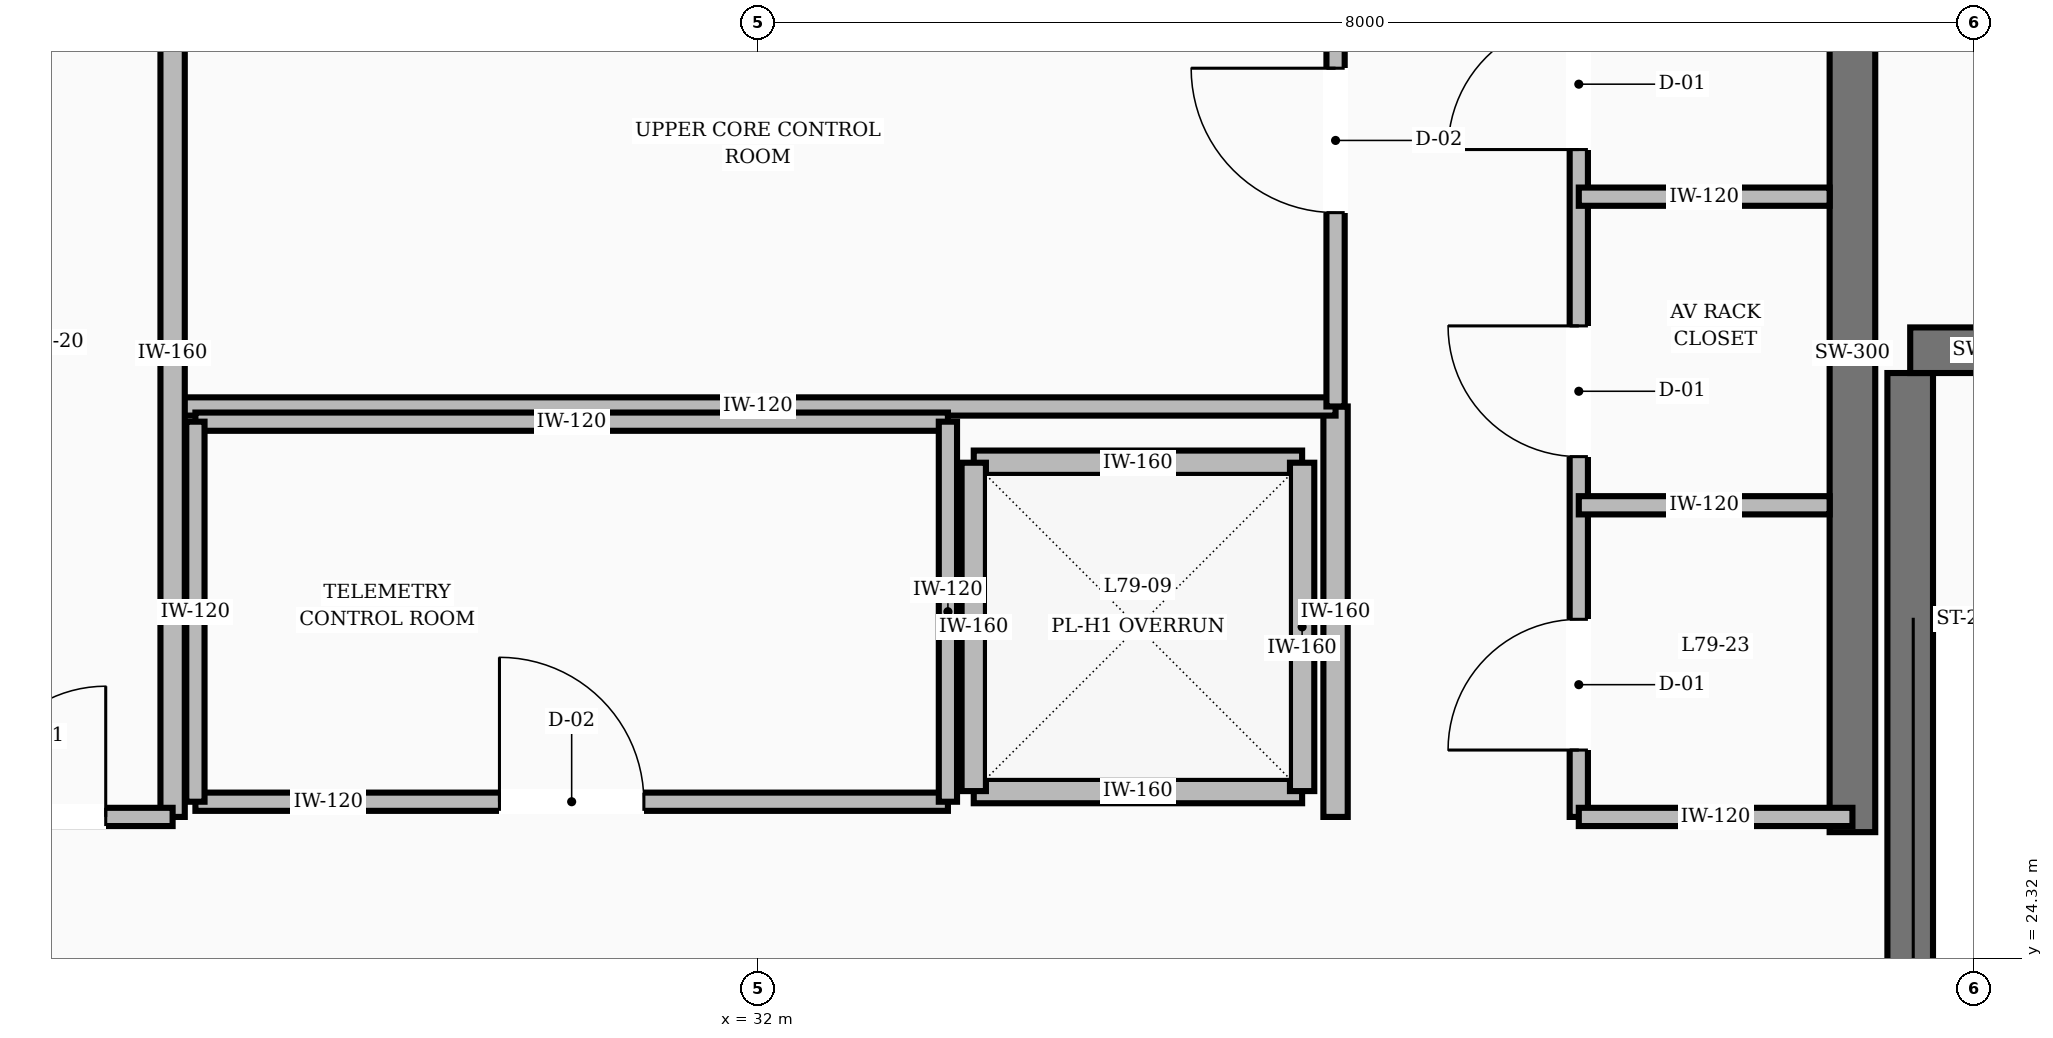
"""IFC4 building model, lengths in metres.
Left out: names, types, materials, properties, quantities, classifications, styles, units other than length and angle.
Written with IfcOpenShell. Run it as: python <this file> out.ifc"""

import sys

from ifc_helpers import new_model, si_unit, direction, frame, frame_2d, origin, place, context, subcontext, project, spatial, rectangle, extrude, element, fill, save


model = new_model("IFC4")
c1 = context("Model", 3, precision=1e-05, world=origin(), true_north=direction((0.0, 1.0)))
c2 = subcontext(c1, "Body", "Model", "MODEL_VIEW")
j1 = project(units=[si_unit("LENGTHUNIT", "METRE"), si_unit("PLANEANGLEUNIT", "RADIAN")], contexts=[c1])
p1 = place(None, origin())
s1 = spatial("IfcSite", under=j1, at=p1, CompositionType="ELEMENT")
p2 = place(p1, origin())
s2 = spatial("IfcBuilding", under=s1, at=p2, CompositionType="ELEMENT")
p3 = place(p2, frame((0.0, 0.0, 302.4)))
s3 = spatial("IfcBuildingStorey", under=s2, at=p3, CompositionType="ELEMENT", Elevation=302.4)
p4 = place(p3, frame((39.2, 25.15, 0.0), z_axis=(0.0, 0.0, 1.0), x_axis=(0.0, 1.0, 0.0)))
e1 = element("IfcWall", 1, at=p4, inside=s3, PredefinedType="SHEAR", context=c2, shape_type="SweptSolid", body=[
    extrude(rectangle(XDim=6.3, YDim=0.3, at=frame_2d((3.15, 0.0))), origin(), (0.0, 0.0, 1.0), 6.0),
])
p5 = place(p3, frame((39.58, 19.43, 0.0), z_axis=(0.0, 0.0, 1.0), x_axis=(0.0, 1.0, 0.0)))
e2 = element("IfcWall", 2, at=p5, inside=s3, PredefinedType="SHEAR", context=c2, shape_type="SweptSolid", body=[
    extrude(rectangle(XDim=8.74, YDim=0.3, at=frame_2d((4.37, 0.0))), origin(), (0.0, 0.0, 1.0), 6.0),
])
p6 = place(p3, frame((39.58, 28.32, 0.0), z_axis=(0.0, 0.0, 1.0), x_axis=(1.0, 0.0, 0.0)))
e3 = element("IfcWall", 3, at=p6, inside=s3, PredefinedType="SHEAR", context=c2, shape_type="SweptSolid", body=[
    extrude(rectangle(XDim=3.6, YDim=0.3, at=frame_2d((1.8, 0.0))), origin(), (0.0, 0.0, 1.0), 6.0),
])
p7 = place(p6, frame((1.3, 0.0, 0.0)))
e4 = element("IfcOpeningElement", 4, at=p7, cuts=e3, PredefinedType="OPENING", context=c2, shape_type="SweptSolid", body=[
    extrude(rectangle(XDim=1.1, YDim=2.1, at=frame_2d((0.55, 1.05))), frame((0.0, 0.16, 0.0), z_axis=(0.0, -1.0, 0.0), x_axis=(1.0, 0.0, 0.0)), (0.0, 0.0, 1.0), 0.32),
])
p8 = place(p3, frame((35.8, 25.25, 0.0), z_axis=(0.0, 0.0, 1.0), x_axis=(0.0, 1.0, 0.0)))
e5 = element("IfcWall", 5, at=p8, inside=s3, PredefinedType="SOLIDWALL", context=c2, shape_type="SweptSolid", body=[
    extrude(rectangle(XDim=2.7, YDim=0.16, at=frame_2d((1.35, 0.0))), origin(), (0.0, 0.0, 1.0), 4.65),
])
for number, where, z_axis, x_axis in (
    (6, (33.42, 25.42, 0.0), (0.0, 0.0, 1.0), (1.0, 0.0, 0.0)),
    (7, (33.42, 27.58, 0.0), (0.0, 0.0, 1.0), (1.0, 0.0, 0.0)),
    (8, (33.42, 25.42, 0.0), (0.0, 0.0, 1.0), (0.0, 1.0, 0.0)),
    (9, (35.58, 25.42, 0.0), (0.0, 0.0, 1.0), (0.0, 1.0, 0.0)),
):
    element("IfcWall", number, at=place(p3, frame(where, z_axis=z_axis, x_axis=x_axis)), inside=s3, PredefinedType="SOLIDWALL", context=c2, shape_type="SweptSolid", body=[
        extrude(rectangle(XDim=2.16, YDim=0.16, at=frame_2d((1.08, 0.0))), origin(), (0.0, 0.0, 1.0), 4.65),
    ])
p9 = place(p3, frame((28.2, 27.95, 0.0), z_axis=(0.0, 0.0, 1.0), x_axis=(1.0, 0.0, 0.0)))
e10 = element("IfcWall", 10, at=p9, inside=s3, PredefinedType="PARTITIONING", context=c2, shape_type="SweptSolid", body=[
    extrude(rectangle(XDim=7.6, YDim=0.12, at=frame_2d((3.8, 0.0))), origin(), (0.0, 0.0, 1.0), 4.65),
])
p10 = place(p3, frame((35.8, 27.95, 0.0), z_axis=(0.0, 0.0, 1.0), x_axis=(0.0, 1.0, 0.0)))
e11 = element("IfcWall", 11, at=p10, inside=s3, PredefinedType="PARTITIONING", context=c2, shape_type="SweptSolid", body=[
    extrude(rectangle(XDim=3.5, YDim=0.12, at=frame_2d((1.75, 0.0))), origin(), (0.0, 0.0, 1.0), 4.65),
])
p11 = place(p10, frame((1.275, 0.0, 0.0)))
e12 = element("IfcOpeningElement", 12, at=p11, cuts=e11, PredefinedType="OPENING", context=c2, shape_type="SweptSolid", body=[
    extrude(rectangle(XDim=0.95, YDim=2.1, at=frame_2d((0.475, 1.05))), frame((0.0, 0.07, 0.0), z_axis=(0.0, -1.0, 0.0), x_axis=(1.0, 0.0, 0.0)), (0.0, 0.0, 1.0), 0.14),
])
p12 = place(p3, frame((28.3, 25.35, 0.0), z_axis=(0.0, 0.0, 1.0), x_axis=(1.0, 0.0, 0.0)))
e13 = element("IfcWall", 13, at=p12, inside=s3, PredefinedType="PARTITIONING", context=c2, shape_type="SweptSolid", body=[
    extrude(rectangle(XDim=4.95, YDim=0.12, at=frame_2d((2.475, 0.0))), origin(), (0.0, 0.0, 1.0), 4.65),
])
p13 = place(p12, frame((2.0, 0.0, 0.0)))
e14 = element("IfcOpeningElement", 14, at=p13, cuts=e13, PredefinedType="OPENING", context=c2, shape_type="SweptSolid", body=[
    extrude(rectangle(XDim=0.95, YDim=2.1, at=frame_2d((0.475, 1.05))), frame((0.0, 0.07, 0.0), z_axis=(0.0, -1.0, 0.0), x_axis=(1.0, 0.0, 0.0)), (0.0, 0.0, 1.0), 0.14),
])
p14 = place(p3, frame((28.3, 27.85, 0.0), z_axis=(0.0, 0.0, 1.0), x_axis=(1.0, 0.0, 0.0)))
e15 = element("IfcWall", 15, at=p14, inside=s3, PredefinedType="PARTITIONING", context=c2, shape_type="SweptSolid", body=[
    extrude(rectangle(XDim=4.95, YDim=0.12, at=frame_2d((2.475, 0.0))), origin(), (0.0, 0.0, 1.0), 4.65),
])
for number, where, z_axis, x_axis in (
    (16, (28.3, 25.35, 0.0), (0.0, 0.0, 1.0), (0.0, 1.0, 0.0)),
    (17, (33.25, 25.35, 0.0), (0.0, 0.0, 1.0), (0.0, 1.0, 0.0)),
):
    element("IfcWall", number, at=place(p3, frame(where, z_axis=z_axis, x_axis=x_axis)), inside=s3, PredefinedType="PARTITIONING", context=c2, shape_type="SweptSolid", body=[
        extrude(rectangle(XDim=2.5, YDim=0.12, at=frame_2d((1.25, 0.0))), origin(), (0.0, 0.0, 1.0), 4.65),
    ])
p15 = place(p3, frame((28.15, 25.25, 0.0), z_axis=(0.0, 0.0, 1.0), x_axis=(0.0, 1.0, 0.0)))
e18 = element("IfcWall", 18, at=p15, inside=s3, PredefinedType="SOLIDWALL", context=c2, shape_type="SweptSolid", body=[
    extrude(rectangle(XDim=6.1, YDim=0.16, at=frame_2d((3.05, 0.0))), origin(), (0.0, 0.0, 1.0), 4.65),
])
p16 = place(p3, frame((24.95, 25.25, 0.0), z_axis=(0.0, 0.0, 1.0), x_axis=(1.0, 0.0, 0.0)))
e19 = element("IfcWall", 19, at=p16, inside=s3, PredefinedType="PARTITIONING", context=c2, shape_type="SweptSolid", body=[
    extrude(rectangle(XDim=3.2, YDim=0.12, at=frame_2d((1.6, 0.0))), origin(), (0.0, 0.0, 1.0), 4.65),
])
p17 = place(p16, frame((0.44, 0.0, 0.0)))
e20 = element("IfcOpeningElement", 20, at=p17, cuts=e19, PredefinedType="OPENING", context=c2, shape_type="SweptSolid", body=[
    extrude(rectangle(XDim=0.86, YDim=2.1, at=frame_2d((0.43, 1.05))), frame((0.0, 0.07, 0.0), z_axis=(0.0, -1.0, 0.0), x_axis=(1.0, 0.0, 0.0)), (0.0, 0.0, 1.0), 0.14),
])
p18 = place(p16, frame((1.9, 0.0, 0.0)))
e21 = element("IfcOpeningElement", 21, at=p18, cuts=e19, PredefinedType="OPENING", context=c2, shape_type="SweptSolid", body=[
    extrude(rectangle(XDim=0.86, YDim=2.1, at=frame_2d((0.43, 1.05))), frame((0.0, 0.07, 0.0), z_axis=(0.0, -1.0, 0.0), x_axis=(1.0, 0.0, 0.0)), (0.0, 0.0, 1.0), 0.14),
])
p19 = place(p3, frame((37.4, 25.25, 0.0), z_axis=(0.0, 0.0, 1.0), x_axis=(0.0, 1.0, 0.0)))
e22 = element("IfcWall", 22, at=p19, inside=s3, PredefinedType="PARTITIONING", context=c2, shape_type="SweptSolid", body=[
    extrude(rectangle(XDim=6.2, YDim=0.12, at=frame_2d((3.1, 0.0))), origin(), (0.0, 0.0, 1.0), 4.65),
])
p20 = place(p19, frame((0.44, 0.0, 0.0)))
e23 = element("IfcOpeningElement", 23, at=p20, cuts=e22, PredefinedType="OPENING", context=c2, shape_type="SweptSolid", body=[
    extrude(rectangle(XDim=0.86, YDim=2.1, at=frame_2d((0.43, 1.05))), frame((0.0, 0.07, 0.0), z_axis=(0.0, -1.0, 0.0), x_axis=(1.0, 0.0, 0.0)), (0.0, 0.0, 1.0), 0.14),
])
p21 = place(p19, frame((2.37, 0.0, 0.0)))
e24 = element("IfcOpeningElement", 24, at=p21, cuts=e22, PredefinedType="OPENING", context=c2, shape_type="SweptSolid", body=[
    extrude(rectangle(XDim=0.86, YDim=2.1, at=frame_2d((0.43, 1.05))), frame((0.0, 0.07, 0.0), z_axis=(0.0, -1.0, 0.0), x_axis=(1.0, 0.0, 0.0)), (0.0, 0.0, 1.0), 0.14),
])
p22 = place(p19, frame((4.39, 0.0, 0.0)))
e25 = element("IfcOpeningElement", 25, at=p22, cuts=e22, PredefinedType="OPENING", context=c2, shape_type="SweptSolid", body=[
    extrude(rectangle(XDim=0.86, YDim=2.1, at=frame_2d((0.43, 1.05))), frame((0.0, 0.07, 0.0), z_axis=(0.0, -1.0, 0.0), x_axis=(1.0, 0.0, 0.0)), (0.0, 0.0, 1.0), 0.14),
])
p23 = place(p3, frame((37.4, 25.25, 0.0), z_axis=(0.0, 0.0, 1.0), x_axis=(1.0, 0.0, 0.0)))
e26 = element("IfcWall", 26, at=p23, inside=s3, PredefinedType="PARTITIONING", context=c2, shape_type="SweptSolid", body=[
    extrude(rectangle(XDim=1.8, YDim=0.12, at=frame_2d((0.9, 0.0))), origin(), (0.0, 0.0, 1.0), 4.65),
])
for number, where, z_axis, x_axis in (
    (27, (37.4, 27.3, 0.0), (0.0, 0.0, 1.0), (1.0, 0.0, 0.0)),
    (28, (37.4, 29.33, 0.0), (0.0, 0.0, 1.0), (1.0, 0.0, 0.0)),
):
    element("IfcWall", number, at=place(p3, frame(where, z_axis=z_axis, x_axis=x_axis)), inside=s3, PredefinedType="PARTITIONING", context=c2, shape_type="SweptSolid", body=[
        extrude(rectangle(XDim=1.65, YDim=0.12, at=frame_2d((0.825, 0.0))), origin(), (0.0, 0.0, 1.0), 4.65),
    ])
p24 = place(p11, origin())
e29 = element("IfcDoor", 29, at=p24, inside=s3, OperationType="SINGLE_SWING_RIGHT", PredefinedType="DOOR", context=c2, shape_type="SweptSolid", body=[
    extrude(rectangle(XDim=0.95, YDim=2.1, at=frame_2d((0.475, 1.05))), frame((0.0, 0.025, 0.0), z_axis=(0.0, -1.0, 0.0), x_axis=(1.0, 0.0, 0.0)), (0.0, 0.0, 1.0), 0.05),
])
fill(e12, e29)
p25 = place(p13, origin())
e30 = element("IfcDoor", 30, at=p25, inside=s3, OperationType="SINGLE_SWING_LEFT", PredefinedType="DOOR", context=c2, shape_type="SweptSolid", body=[
    extrude(rectangle(XDim=0.95, YDim=2.1, at=frame_2d((0.475, 1.05))), frame((0.0, 0.025, 0.0), z_axis=(0.0, -1.0, 0.0), x_axis=(1.0, 0.0, 0.0)), (0.0, 0.0, 1.0), 0.05),
])
fill(e14, e30)
p26 = place(p18, origin())
e31 = element("IfcDoor", 31, at=p26, inside=s3, OperationType="SINGLE_SWING_RIGHT", PredefinedType="DOOR", context=c2, shape_type="SweptSolid", body=[
    extrude(rectangle(XDim=0.86, YDim=2.1, at=frame_2d((0.43, 1.05))), frame((0.0, 0.025, 0.0), z_axis=(0.0, -1.0, 0.0), x_axis=(1.0, 0.0, 0.0)), (0.0, 0.0, 1.0), 0.05),
])
fill(e21, e31)
p27 = place(p20, origin())
e32 = element("IfcDoor", 32, at=p27, inside=s3, OperationType="SINGLE_SWING_LEFT", PredefinedType="DOOR", context=c2, shape_type="SweptSolid", body=[
    extrude(rectangle(XDim=0.86, YDim=2.1, at=frame_2d((0.43, 1.05))), frame((0.0, 0.025, 0.0), z_axis=(0.0, -1.0, 0.0), x_axis=(1.0, 0.0, 0.0)), (0.0, 0.0, 1.0), 0.05),
])
fill(e23, e32)
p28 = place(p21, origin())
e33 = element("IfcDoor", 33, at=p28, inside=s3, OperationType="SINGLE_SWING_RIGHT", PredefinedType="DOOR", context=c2, shape_type="SweptSolid", body=[
    extrude(rectangle(XDim=0.86, YDim=2.1, at=frame_2d((0.43, 1.05))), frame((0.0, 0.025, 0.0), z_axis=(0.0, -1.0, 0.0), x_axis=(1.0, 0.0, 0.0)), (0.0, 0.0, 1.0), 0.05),
])
fill(e24, e33)
p29 = place(p22, origin())
e34 = element("IfcDoor", 34, at=p29, inside=s3, OperationType="SINGLE_SWING_LEFT", PredefinedType="DOOR", context=c2, shape_type="SweptSolid", body=[
    extrude(rectangle(XDim=0.86, YDim=2.1, at=frame_2d((0.43, 1.05))), frame((0.0, 0.025, 0.0), z_axis=(0.0, -1.0, 0.0), x_axis=(1.0, 0.0, 0.0)), (0.0, 0.0, 1.0), 0.05),
])
fill(e25, e34)
save(model, sys.argv[1])
